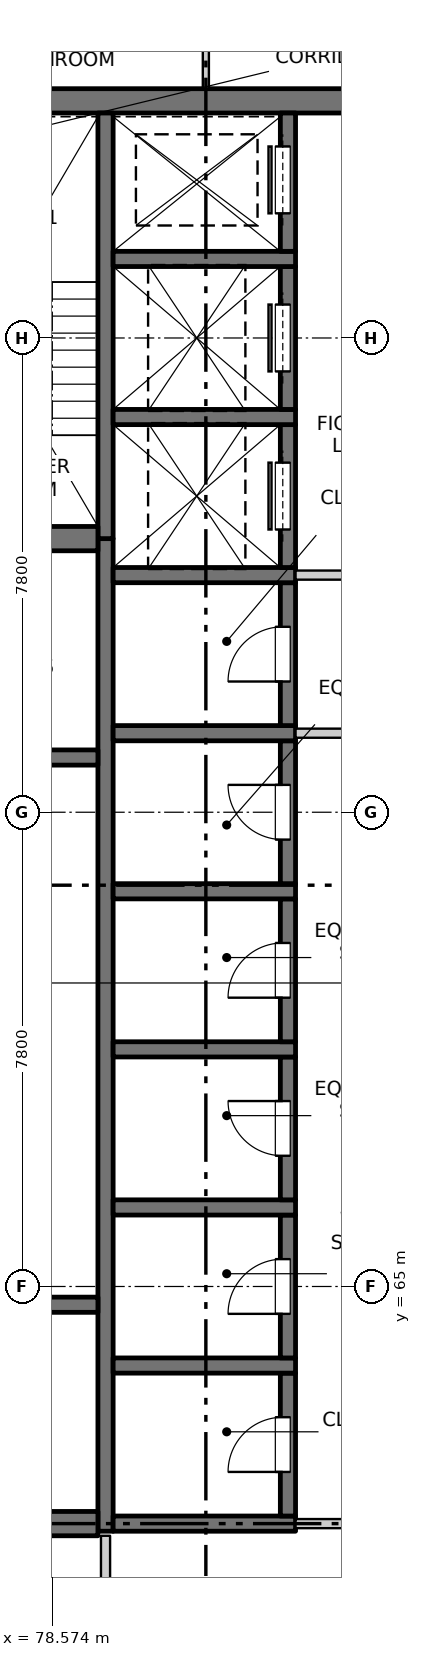
"""IFC4 building model, lengths in metres.
Left out: names, types, materials, properties, quantities, classifications, styles, units other than length and angle.
Written with IfcOpenShell. Run it as: python <this file> out.ifc"""

import sys

from ifc_helpers import new_model, si_unit, direction, frame, frame_2d, origin, place, context, subcontext, project, spatial, rectangle, extrude, element, fill, save


model = new_model("IFC4")
c1 = context("Model", 3, precision=1e-05, world=origin(), true_north=direction((0.0, 1.0)))
c2 = subcontext(c1, "Body", "Model", "MODEL_VIEW")
j1 = project(units=[si_unit("LENGTHUNIT", "METRE"), si_unit("PLANEANGLEUNIT", "RADIAN")], contexts=[c1])
p1 = place(None, origin())
s1 = spatial("IfcSite", under=j1, at=p1, CompositionType="ELEMENT")
p2 = place(p1, origin())
s2 = spatial("IfcBuilding", under=s1, at=p2, CompositionType="ELEMENT")
p3 = place(p2, frame((0.0, 0.0, 214.3)))
s3 = spatial("IfcBuildingStorey", under=s2, at=p3, CompositionType="ELEMENT", Elevation=214.3)
p4 = place(p3, frame((75.45, 84.5, -0.25), z_axis=(0.0, 0.0, 1.0), x_axis=(1.0, 0.0, 0.0)))
e1 = element("IfcWall", 1, at=p4, inside=s3, PredefinedType="SOLIDWALL", context=c2, shape_type="SweptSolid", body=[
    extrude(rectangle(XDim=19.1, YDim=0.4, at=frame_2d((9.55, 0.0))), origin(), (0.0, 0.0, 1.0), 3.4),
])
p5 = place(p3, frame((79.45, 60.975, -0.25), z_axis=(0.0, 0.0, 1.0), x_axis=(0.0, 1.0, 0.0)))
e2 = element("IfcWall", 2, at=p5, inside=s3, PredefinedType="SOLIDWALL", context=c2, shape_type="SweptSolid", body=[
    extrude(rectangle(XDim=16.325, YDim=0.25, at=frame_2d((8.163, 0.0))), origin(), (0.0, 0.0, 1.0), 3.4),
])
p6 = place(p3, frame((79.45, 77.3, -0.25), z_axis=(0.0, 0.0, 1.0), x_axis=(0.0, 1.0, 0.0)))
e3 = element("IfcWall", 3, at=p6, inside=s3, PredefinedType="SOLIDWALL", context=c2, shape_type="SweptSolid", body=[
    extrude(rectangle(XDim=7.0, YDim=0.25, at=frame_2d((3.5, 0.0))), origin(), (0.0, 0.0, 1.0), 3.4),
])
p7 = place(p3, frame((79.575, 61.1, -0.25), z_axis=(0.0, 0.0, 1.0), x_axis=(1.0, 0.0, 0.0)))
e4 = element("IfcWall", 4, at=p7, inside=s3, PredefinedType="SOLIDWALL", context=c2, shape_type="SweptSolid", body=[
    extrude(rectangle(XDim=3.0, YDim=0.25, at=frame_2d((1.5, 0.0))), origin(), (0.0, 0.0, 1.0), 3.4),
])
p8 = place(p3, frame((82.45, 61.225, -0.25), z_axis=(0.0, 0.0, 1.0), x_axis=(0.0, 1.0, 0.0)))
e5 = element("IfcWall", 5, at=p8, inside=s3, PredefinedType="SOLIDWALL", context=c2, shape_type="SweptSolid", body=[
    extrude(rectangle(XDim=2.35, YDim=0.25, at=frame_2d((1.175, 0.0))), origin(), (0.0, 0.0, 1.0), 3.4),
])
p9 = place(p8, frame((0.725, 0.0, 0.25)))
e6 = element("IfcOpeningElement", 6, at=p9, cuts=e5, PredefinedType="OPENING", context=c2, shape_type="SweptSolid", body=[
    extrude(rectangle(XDim=0.9, YDim=2.1, at=frame_2d((0.45, 1.05))), frame((0.0, 0.135, 0.0), z_axis=(0.0, -1.0, 0.0), x_axis=(1.0, 0.0, 0.0)), (0.0, 0.0, 1.0), 0.27),
])
p10 = place(p3, frame((79.575, 63.7, -0.25), z_axis=(0.0, 0.0, 1.0), x_axis=(1.0, 0.0, 0.0)))
e7 = element("IfcWall", 7, at=p10, inside=s3, PredefinedType="SOLIDWALL", context=c2, shape_type="SweptSolid", body=[
    extrude(rectangle(XDim=3.0, YDim=0.25, at=frame_2d((1.5, 0.0))), origin(), (0.0, 0.0, 1.0), 3.4),
])
p11 = place(p3, frame((82.45, 63.825, -0.25), z_axis=(0.0, 0.0, 1.0), x_axis=(0.0, 1.0, 0.0)))
e8 = element("IfcWall", 8, at=p11, inside=s3, PredefinedType="SOLIDWALL", context=c2, shape_type="SweptSolid", body=[
    extrude(rectangle(XDim=2.35, YDim=0.25, at=frame_2d((1.175, 0.0))), origin(), (0.0, 0.0, 1.0), 3.4),
])
p12 = place(p11, frame((0.725, 0.0, 0.25)))
e9 = element("IfcOpeningElement", 9, at=p12, cuts=e8, PredefinedType="OPENING", context=c2, shape_type="SweptSolid", body=[
    extrude(rectangle(XDim=0.9, YDim=2.1, at=frame_2d((0.45, 1.05))), frame((0.0, 0.135, 0.0), z_axis=(0.0, -1.0, 0.0), x_axis=(1.0, 0.0, 0.0)), (0.0, 0.0, 1.0), 0.27),
])
p13 = place(p3, frame((79.575, 66.3, -0.25), z_axis=(0.0, 0.0, 1.0), x_axis=(1.0, 0.0, 0.0)))
e10 = element("IfcWall", 10, at=p13, inside=s3, PredefinedType="SOLIDWALL", context=c2, shape_type="SweptSolid", body=[
    extrude(rectangle(XDim=3.0, YDim=0.25, at=frame_2d((1.5, 0.0))), origin(), (0.0, 0.0, 1.0), 3.4),
])
p14 = place(p3, frame((82.45, 66.425, -0.25), z_axis=(0.0, 0.0, 1.0), x_axis=(0.0, 1.0, 0.0)))
e11 = element("IfcWall", 11, at=p14, inside=s3, PredefinedType="SOLIDWALL", context=c2, shape_type="SweptSolid", body=[
    extrude(rectangle(XDim=2.35, YDim=0.25, at=frame_2d((1.175, 0.0))), origin(), (0.0, 0.0, 1.0), 3.4),
])
p15 = place(p14, frame((0.725, 0.0, 0.25)))
e12 = element("IfcOpeningElement", 12, at=p15, cuts=e11, PredefinedType="OPENING", context=c2, shape_type="SweptSolid", body=[
    extrude(rectangle(XDim=0.9, YDim=2.1, at=frame_2d((0.45, 1.05))), frame((0.0, 0.135, 0.0), z_axis=(0.0, -1.0, 0.0), x_axis=(1.0, 0.0, 0.0)), (0.0, 0.0, 1.0), 0.27),
])
p16 = place(p3, frame((79.575, 68.9, -0.25), z_axis=(0.0, 0.0, 1.0), x_axis=(1.0, 0.0, 0.0)))
e13 = element("IfcWall", 13, at=p16, inside=s3, PredefinedType="SOLIDWALL", context=c2, shape_type="SweptSolid", body=[
    extrude(rectangle(XDim=3.0, YDim=0.25, at=frame_2d((1.5, 0.0))), origin(), (0.0, 0.0, 1.0), 3.4),
])
p17 = place(p3, frame((82.45, 69.025, -0.25), z_axis=(0.0, 0.0, 1.0), x_axis=(0.0, 1.0, 0.0)))
e14 = element("IfcWall", 14, at=p17, inside=s3, PredefinedType="SOLIDWALL", context=c2, shape_type="SweptSolid", body=[
    extrude(rectangle(XDim=2.35, YDim=0.25, at=frame_2d((1.175, 0.0))), origin(), (0.0, 0.0, 1.0), 3.4),
])
p18 = place(p17, frame((0.725, 0.0, 0.25)))
e15 = element("IfcOpeningElement", 15, at=p18, cuts=e14, PredefinedType="OPENING", context=c2, shape_type="SweptSolid", body=[
    extrude(rectangle(XDim=0.9, YDim=2.1, at=frame_2d((0.45, 1.05))), frame((0.0, 0.135, 0.0), z_axis=(0.0, -1.0, 0.0), x_axis=(1.0, 0.0, 0.0)), (0.0, 0.0, 1.0), 0.27),
])
p19 = place(p3, frame((79.575, 71.5, -0.25), z_axis=(0.0, 0.0, 1.0), x_axis=(1.0, 0.0, 0.0)))
e16 = element("IfcWall", 16, at=p19, inside=s3, PredefinedType="SOLIDWALL", context=c2, shape_type="SweptSolid", body=[
    extrude(rectangle(XDim=3.0, YDim=0.25, at=frame_2d((1.5, 0.0))), origin(), (0.0, 0.0, 1.0), 3.4),
])
p20 = place(p3, frame((82.45, 71.625, -0.25), z_axis=(0.0, 0.0, 1.0), x_axis=(0.0, 1.0, 0.0)))
e17 = element("IfcWall", 17, at=p20, inside=s3, PredefinedType="SOLIDWALL", context=c2, shape_type="SweptSolid", body=[
    extrude(rectangle(XDim=2.35, YDim=0.25, at=frame_2d((1.175, 0.0))), origin(), (0.0, 0.0, 1.0), 3.4),
])
p21 = place(p20, frame((0.725, 0.0, 0.25)))
e18 = element("IfcOpeningElement", 18, at=p21, cuts=e17, PredefinedType="OPENING", context=c2, shape_type="SweptSolid", body=[
    extrude(rectangle(XDim=0.9, YDim=2.1, at=frame_2d((0.45, 1.05))), frame((0.0, 0.135, 0.0), z_axis=(0.0, -1.0, 0.0), x_axis=(1.0, 0.0, 0.0)), (0.0, 0.0, 1.0), 0.27),
])
p22 = place(p3, frame((79.575, 74.1, -0.25), z_axis=(0.0, 0.0, 1.0), x_axis=(1.0, 0.0, 0.0)))
e19 = element("IfcWall", 19, at=p22, inside=s3, PredefinedType="SOLIDWALL", context=c2, shape_type="SweptSolid", body=[
    extrude(rectangle(XDim=3.0, YDim=0.25, at=frame_2d((1.5, 0.0))), origin(), (0.0, 0.0, 1.0), 3.4),
])
p23 = place(p3, frame((82.45, 74.225, -0.25), z_axis=(0.0, 0.0, 1.0), x_axis=(0.0, 1.0, 0.0)))
e20 = element("IfcWall", 20, at=p23, inside=s3, PredefinedType="SOLIDWALL", context=c2, shape_type="SweptSolid", body=[
    extrude(rectangle(XDim=2.35, YDim=0.25, at=frame_2d((1.175, 0.0))), origin(), (0.0, 0.0, 1.0), 3.4),
])
p24 = place(p23, frame((0.725, 0.0, 0.25)))
e21 = element("IfcOpeningElement", 21, at=p24, cuts=e20, PredefinedType="OPENING", context=c2, shape_type="SweptSolid", body=[
    extrude(rectangle(XDim=0.9, YDim=2.1, at=frame_2d((0.45, 1.05))), frame((0.0, 0.135, 0.0), z_axis=(0.0, -1.0, 0.0), x_axis=(1.0, 0.0, 0.0)), (0.0, 0.0, 1.0), 0.27),
])
p25 = place(p3, frame((79.575, 76.7, -0.25), z_axis=(0.0, 0.0, 1.0), x_axis=(1.0, 0.0, 0.0)))
e22 = element("IfcWall", 22, at=p25, inside=s3, PredefinedType="SOLIDWALL", context=c2, shape_type="SweptSolid", body=[
    extrude(rectangle(XDim=3.0, YDim=0.25, at=frame_2d((1.5, 0.0))), origin(), (0.0, 0.0, 1.0), 3.4),
])
p26 = place(p3, frame((82.45, 76.825, -0.25), z_axis=(0.0, 0.0, 1.0), x_axis=(0.0, 1.0, 0.0)))
e23 = element("IfcWall", 23, at=p26, inside=s3, PredefinedType="SOLIDWALL", context=c2, shape_type="SweptSolid", body=[
    extrude(rectangle(XDim=2.35, YDim=0.25, at=frame_2d((1.175, 0.0))), origin(), (0.0, 0.0, 1.0), 3.4),
])
p27 = place(p26, frame((0.625, 0.0, 0.25)))
e24 = element("IfcOpeningElement", 24, at=p27, cuts=e23, PredefinedType="OPENING", context=c2, shape_type="SweptSolid", body=[
    extrude(rectangle(XDim=1.1, YDim=2.1, at=frame_2d((0.55, 1.05))), frame((0.0, 0.135, 0.0), z_axis=(0.0, -1.0, 0.0), x_axis=(1.0, 0.0, 0.0)), (0.0, 0.0, 1.0), 0.27),
])
p28 = place(p3, frame((79.575, 79.3, -0.25), z_axis=(0.0, 0.0, 1.0), x_axis=(1.0, 0.0, 0.0)))
e25 = element("IfcWall", 25, at=p28, inside=s3, PredefinedType="SOLIDWALL", context=c2, shape_type="SweptSolid", body=[
    extrude(rectangle(XDim=3.0, YDim=0.25, at=frame_2d((1.5, 0.0))), origin(), (0.0, 0.0, 1.0), 3.4),
])
p29 = place(p3, frame((82.45, 79.425, -0.25), z_axis=(0.0, 0.0, 1.0), x_axis=(0.0, 1.0, 0.0)))
e26 = element("IfcWall", 26, at=p29, inside=s3, PredefinedType="SOLIDWALL", context=c2, shape_type="SweptSolid", body=[
    extrude(rectangle(XDim=2.35, YDim=0.25, at=frame_2d((1.175, 0.0))), origin(), (0.0, 0.0, 1.0), 3.4),
])
p30 = place(p29, frame((0.625, 0.0, 0.25)))
e27 = element("IfcOpeningElement", 27, at=p30, cuts=e26, PredefinedType="OPENING", context=c2, shape_type="SweptSolid", body=[
    extrude(rectangle(XDim=1.1, YDim=2.1, at=frame_2d((0.55, 1.05))), frame((0.0, 0.135, 0.0), z_axis=(0.0, -1.0, 0.0), x_axis=(1.0, 0.0, 0.0)), (0.0, 0.0, 1.0), 0.27),
])
p31 = place(p3, frame((79.575, 81.9, -0.25), z_axis=(0.0, 0.0, 1.0), x_axis=(1.0, 0.0, 0.0)))
e28 = element("IfcWall", 28, at=p31, inside=s3, PredefinedType="SOLIDWALL", context=c2, shape_type="SweptSolid", body=[
    extrude(rectangle(XDim=3.0, YDim=0.25, at=frame_2d((1.5, 0.0))), origin(), (0.0, 0.0, 1.0), 3.4),
])
p32 = place(p3, frame((82.45, 82.025, -0.25), z_axis=(0.0, 0.0, 1.0), x_axis=(0.0, 1.0, 0.0)))
e29 = element("IfcWall", 29, at=p32, inside=s3, PredefinedType="SOLIDWALL", context=c2, shape_type="SweptSolid", body=[
    extrude(rectangle(XDim=2.275, YDim=0.25, at=frame_2d((1.138, 0.0))), origin(), (0.0, 0.0, 1.0), 3.4),
])
p33 = place(p32, frame((0.625, 0.0, 0.25)))
e30 = element("IfcOpeningElement", 30, at=p33, cuts=e29, PredefinedType="OPENING", context=c2, shape_type="SweptSolid", body=[
    extrude(rectangle(XDim=1.1, YDim=2.1, at=frame_2d((0.55, 1.05))), frame((0.0, 0.135, 0.0), z_axis=(0.0, -1.0, 0.0), x_axis=(1.0, 0.0, 0.0)), (0.0, 0.0, 1.0), 0.27),
])
p34 = place(p3, frame((75.45, 61.1, -0.25), z_axis=(0.0, 0.0, 1.0), x_axis=(1.0, 0.0, 0.0)))
e31 = element("IfcWall", 31, at=p34, inside=s3, PredefinedType="SOLIDWALL", context=c2, shape_type="SweptSolid", body=[
    extrude(rectangle(XDim=3.875, YDim=0.4, at=frame_2d((1.938, 0.0))), origin(), (0.0, 0.0, 1.0), 3.4),
])
for number, where, z_axis, x_axis in (
    (32, (75.45, 64.7, -0.25), (0.0, 0.0, 1.0), (1.0, 0.0, 0.0)),
    (33, (75.45, 73.7, -0.25), (0.0, 0.0, 1.0), (1.0, 0.0, 0.0)),
):
    element("IfcWall", number, at=place(p3, frame(where, z_axis=z_axis, x_axis=x_axis)), inside=s3, PredefinedType="SOLIDWALL", context=c2, shape_type="SweptSolid", body=[
        extrude(rectangle(XDim=3.875, YDim=0.25, at=frame_2d((1.938, 0.0))), origin(), (0.0, 0.0, 1.0), 3.4),
    ])
p35 = place(p3, frame((75.45, 77.3, -0.25), z_axis=(0.0, 0.0, 1.0), x_axis=(1.0, 0.0, 0.0)))
e34 = element("IfcWall", 34, at=p35, inside=s3, PredefinedType="SOLIDWALL", context=c2, shape_type="SweptSolid", body=[
    extrude(rectangle(XDim=3.875, YDim=0.4, at=frame_2d((1.938, 0.0))), origin(), (0.0, 0.0, 1.0), 3.4),
])
p36 = place(p3, frame((82.575, 61.1, 0.0), z_axis=(0.0, 0.0, 1.0), x_axis=(1.0, 0.0, 0.0)))
e35 = element("IfcWall", 35, at=p36, inside=s3, PredefinedType="PARTITIONING", context=c2, shape_type="SweptSolid", body=[
    extrude(rectangle(XDim=4.85, YDim=0.15, at=frame_2d((2.425, 0.0))), origin(), (0.0, 0.0, 1.0), 3.15),
])
p37 = place(p36, frame((1.525, 0.0, 0.0)))
e36 = element("IfcOpeningElement", 36, at=p37, cuts=e35, PredefinedType="OPENING", context=c2, shape_type="SweptSolid", body=[
    extrude(rectangle(XDim=1.8, YDim=2.1, at=frame_2d((0.9, 1.05))), frame((0.0, 0.085, 0.0), z_axis=(0.0, -1.0, 0.0), x_axis=(1.0, 0.0, 0.0)), (0.0, 0.0, 1.0), 0.17),
])
p38 = place(p3, frame((82.575, 74.1, 0.0), z_axis=(0.0, 0.0, 1.0), x_axis=(1.0, 0.0, 0.0)))
e37 = element("IfcWall", 37, at=p38, inside=s3, PredefinedType="PARTITIONING", context=c2, shape_type="SweptSolid", body=[
    extrude(rectangle(XDim=4.85, YDim=0.15, at=frame_2d((2.425, 0.0))), origin(), (0.0, 0.0, 1.0), 3.15),
])
p39 = place(p38, frame((1.525, 0.0, 0.0)))
e38 = element("IfcOpeningElement", 38, at=p39, cuts=e37, PredefinedType="OPENING", context=c2, shape_type="SweptSolid", body=[
    extrude(rectangle(XDim=1.8, YDim=2.1, at=frame_2d((0.9, 1.05))), frame((0.0, 0.085, 0.0), z_axis=(0.0, -1.0, 0.0), x_axis=(1.0, 0.0, 0.0)), (0.0, 0.0, 1.0), 0.17),
])
p40 = place(p3, frame((82.575, 76.7, 0.0), z_axis=(0.0, 0.0, 1.0), x_axis=(1.0, 0.0, 0.0)))
e39 = element("IfcWall", 39, at=p40, inside=s3, PredefinedType="PARTITIONING", context=c2, shape_type="SweptSolid", body=[
    extrude(rectangle(XDim=4.85, YDim=0.15, at=frame_2d((2.425, 0.0))), origin(), (0.0, 0.0, 1.0), 3.15),
])
p41 = place(p40, frame((1.525, 0.0, 0.0)))
e40 = element("IfcOpeningElement", 40, at=p41, cuts=e39, PredefinedType="OPENING", context=c2, shape_type="SweptSolid", body=[
    extrude(rectangle(XDim=1.8, YDim=2.1, at=frame_2d((0.9, 1.05))), frame((0.0, 0.085, 0.0), z_axis=(0.0, -1.0, 0.0), x_axis=(1.0, 0.0, 0.0)), (0.0, 0.0, 1.0), 0.17),
])
p42 = place(p3, frame((79.45, 55.45, 0.0), z_axis=(0.0, 0.0, 1.0), x_axis=(0.0, 1.0, 0.0)))
e41 = element("IfcWall", 41, at=p42, inside=s3, PredefinedType="PARTITIONING", context=c2, shape_type="SweptSolid", body=[
    extrude(rectangle(XDim=5.45, YDim=0.15, at=frame_2d((2.725, 0.0))), origin(), (0.0, 0.0, 1.0), 3.15),
])
p43 = place(p42, frame((2.25, 0.0, 0.0)))
e42 = element("IfcOpeningElement", 42, at=p43, cuts=e41, PredefinedType="OPENING", context=c2, shape_type="SweptSolid", body=[
    extrude(rectangle(XDim=0.9, YDim=2.1, at=frame_2d((0.45, 1.05))), frame((0.0, 0.085, 0.0), z_axis=(0.0, -1.0, 0.0), x_axis=(1.0, 0.0, 0.0)), (0.0, 0.0, 1.0), 0.17),
])
p44 = place(p3, frame((81.1, 84.7, 0.0), z_axis=(0.0, 0.0, 1.0), x_axis=(0.0, 1.0, 0.0)))
e43 = element("IfcWall", 43, at=p44, inside=s3, PredefinedType="PARTITIONING", context=c2, shape_type="SweptSolid", body=[
    extrude(rectangle(XDim=3.4, YDim=0.1, at=frame_2d((1.7, 0.0))), origin(), (0.0, 0.0, 1.0), 3.15),
])
p45 = place(p44, frame((1.3, 0.0, 0.0)))
e44 = element("IfcOpeningElement", 44, at=p45, cuts=e43, PredefinedType="OPENING", context=c2, shape_type="SweptSolid", body=[
    extrude(rectangle(XDim=0.9, YDim=2.1, at=frame_2d((0.45, 1.05))), frame((0.0, 0.06, 0.0), z_axis=(0.0, -1.0, 0.0), x_axis=(1.0, 0.0, 0.0)), (0.0, 0.0, 1.0), 0.12),
])
p46 = place(p9, origin())
e45 = element("IfcDoor", 45, at=p46, inside=s3, OperationType="SINGLE_SWING_LEFT", PredefinedType="DOOR", context=c2, shape_type="SweptSolid", body=[
    extrude(rectangle(XDim=0.9, YDim=2.1, at=frame_2d((0.45, 1.05))), frame((0.0, 0.11, 0.0), z_axis=(0.0, -1.0, 0.0), x_axis=(1.0, 0.0, 0.0)), (0.0, 0.0, 1.0), 0.05),
])
fill(e6, e45)
p47 = place(p12, origin())
e46 = element("IfcDoor", 46, at=p47, inside=s3, OperationType="SINGLE_SWING_LEFT", PredefinedType="DOOR", context=c2, shape_type="SweptSolid", body=[
    extrude(rectangle(XDim=0.9, YDim=2.1, at=frame_2d((0.45, 1.05))), frame((0.0, 0.11, 0.0), z_axis=(0.0, -1.0, 0.0), x_axis=(1.0, 0.0, 0.0)), (0.0, 0.0, 1.0), 0.05),
])
fill(e9, e46)
p48 = place(p15, origin())
e47 = element("IfcDoor", 47, at=p48, inside=s3, OperationType="SINGLE_SWING_RIGHT", PredefinedType="DOOR", context=c2, shape_type="SweptSolid", body=[
    extrude(rectangle(XDim=0.9, YDim=2.1, at=frame_2d((0.45, 1.05))), frame((0.0, 0.11, 0.0), z_axis=(0.0, -1.0, 0.0), x_axis=(1.0, 0.0, 0.0)), (0.0, 0.0, 1.0), 0.05),
])
fill(e12, e47)
p49 = place(p18, origin())
e48 = element("IfcDoor", 48, at=p49, inside=s3, OperationType="SINGLE_SWING_LEFT", PredefinedType="DOOR", context=c2, shape_type="SweptSolid", body=[
    extrude(rectangle(XDim=0.9, YDim=2.1, at=frame_2d((0.45, 1.05))), frame((0.0, 0.11, 0.0), z_axis=(0.0, -1.0, 0.0), x_axis=(1.0, 0.0, 0.0)), (0.0, 0.0, 1.0), 0.05),
])
fill(e15, e48)
p50 = place(p21, origin())
e49 = element("IfcDoor", 49, at=p50, inside=s3, OperationType="SINGLE_SWING_RIGHT", PredefinedType="DOOR", context=c2, shape_type="SweptSolid", body=[
    extrude(rectangle(XDim=0.9, YDim=2.1, at=frame_2d((0.45, 1.05))), frame((0.0, 0.11, 0.0), z_axis=(0.0, -1.0, 0.0), x_axis=(1.0, 0.0, 0.0)), (0.0, 0.0, 1.0), 0.05),
])
fill(e18, e49)
p51 = place(p24, origin())
e50 = element("IfcDoor", 50, at=p51, inside=s3, OperationType="SINGLE_SWING_LEFT", PredefinedType="DOOR", context=c2, shape_type="SweptSolid", body=[
    extrude(rectangle(XDim=0.9, YDim=2.1, at=frame_2d((0.45, 1.05))), frame((0.0, 0.11, 0.0), z_axis=(0.0, -1.0, 0.0), x_axis=(1.0, 0.0, 0.0)), (0.0, 0.0, 1.0), 0.05),
])
fill(e21, e50)
p52 = place(p27, origin())
e51 = element("IfcDoor", 51, at=p52, inside=s3, OperationType="SLIDING_TO_LEFT", PredefinedType="DOOR", context=c2, shape_type="SweptSolid", body=[
    extrude(rectangle(XDim=1.1, YDim=2.1, at=frame_2d((0.55, 1.05))), frame((0.0, 0.11, 0.0), z_axis=(0.0, -1.0, 0.0), x_axis=(1.0, 0.0, 0.0)), (0.0, 0.0, 1.0), 0.05),
])
fill(e24, e51)
p53 = place(p30, origin())
e52 = element("IfcDoor", 52, at=p53, inside=s3, OperationType="SLIDING_TO_LEFT", PredefinedType="DOOR", context=c2, shape_type="SweptSolid", body=[
    extrude(rectangle(XDim=1.1, YDim=2.1, at=frame_2d((0.55, 1.05))), frame((0.0, 0.11, 0.0), z_axis=(0.0, -1.0, 0.0), x_axis=(1.0, 0.0, 0.0)), (0.0, 0.0, 1.0), 0.05),
])
fill(e27, e52)
p54 = place(p33, origin())
e53 = element("IfcDoor", 53, at=p54, inside=s3, OperationType="SLIDING_TO_RIGHT", PredefinedType="DOOR", context=c2, shape_type="SweptSolid", body=[
    extrude(rectangle(XDim=1.1, YDim=2.1, at=frame_2d((0.55, 1.05))), frame((0.0, 0.11, 0.0), z_axis=(0.0, -1.0, 0.0), x_axis=(1.0, 0.0, 0.0)), (0.0, 0.0, 1.0), 0.05),
])
fill(e30, e53)
save(model, sys.argv[1])
